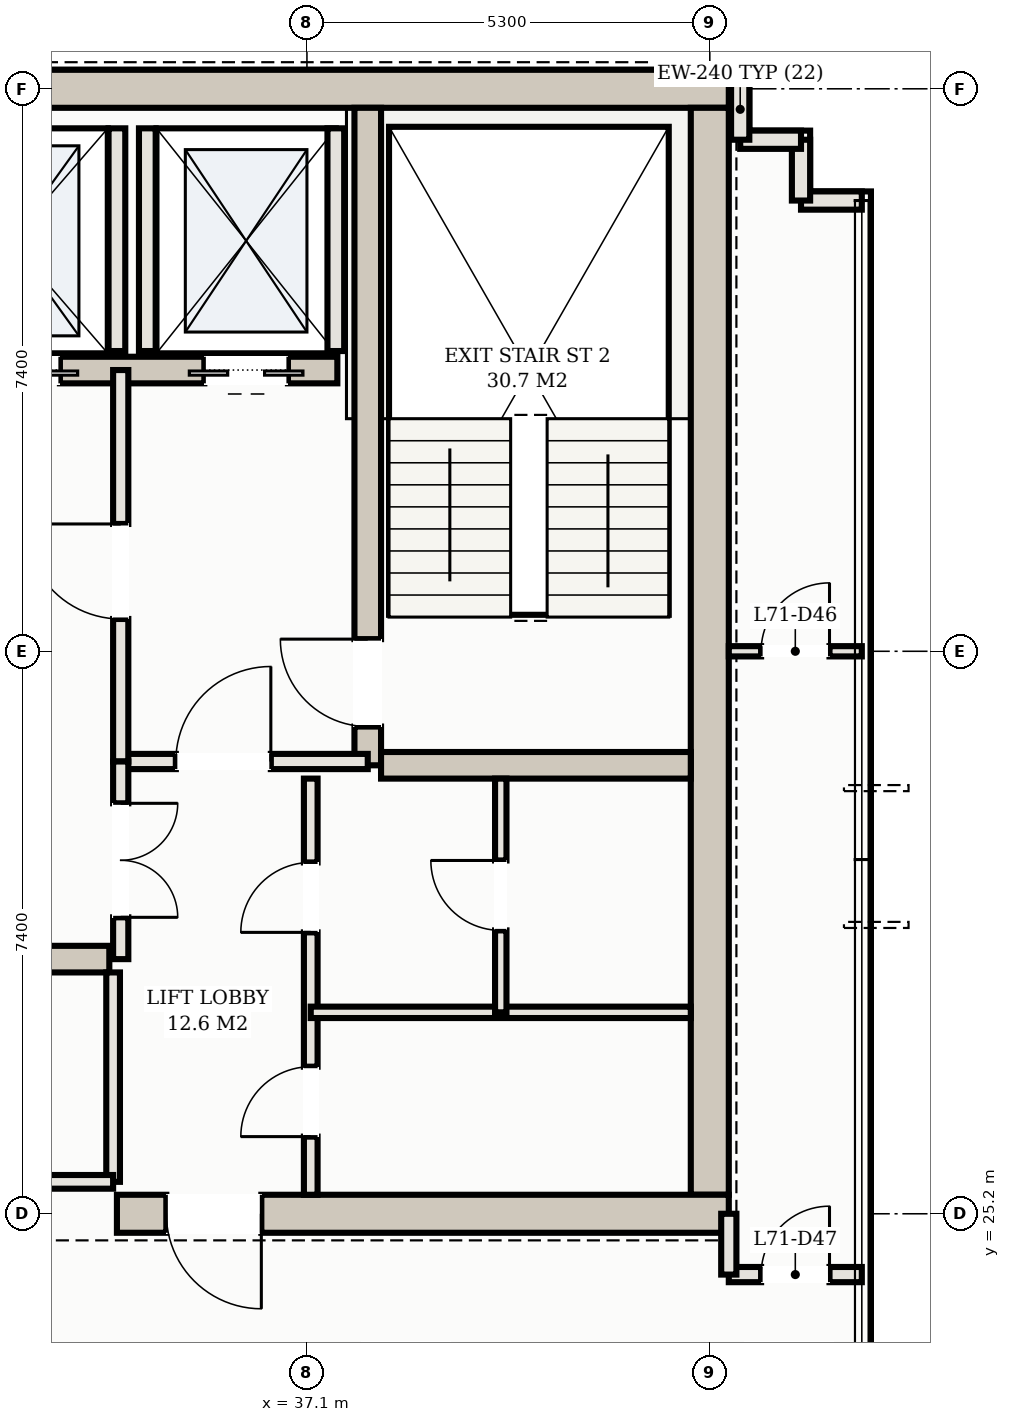
"""IFC4 building model, lengths in metres.
Left out: names, types, materials, properties, quantities, classifications, styles, units other than length and angle.
Written with IfcOpenShell. Run it as: python <this file> out.ifc"""

import sys

from ifc_helpers import new_model, si_unit, direction, frame, frame_2d, origin, place, context, subcontext, project, spatial, rectangle, extrude, element, fill, save


model = new_model("IFC4")
c1 = context("Model", 3, precision=1e-05, world=origin(), true_north=direction((0.0, 1.0)))
c2 = subcontext(c1, "Body", "Model", "MODEL_VIEW")
j1 = project(units=[si_unit("LENGTHUNIT", "METRE"), si_unit("PLANEANGLEUNIT", "RADIAN")], contexts=[c1])
p1 = place(None, origin())
s1 = spatial("IfcSite", under=j1, at=p1, CompositionType="ELEMENT")
p2 = place(p1, origin())
s2 = spatial("IfcBuilding", under=s1, at=p2, CompositionType="ELEMENT")
p3 = place(p2, frame((0.0, 0.0, 256.1)))
s3 = spatial("IfcBuildingStorey", under=s2, at=p3, CompositionType="ELEMENT", Elevation=256.1)
p4 = place(p3, frame((10.35, 40.0, 0.0), z_axis=(0.0, 0.0, 1.0), x_axis=(1.0, 0.0, 0.0)))
e1 = element("IfcWall", 1, at=p4, inside=s3, PredefinedType="SHEAR", context=c2, shape_type="SweptSolid", body=[
    extrude(rectangle(XDim=32.3, YDim=0.5, at=frame_2d((16.15, 0.0))), origin(), (0.0, 0.0, 1.0), 3.11),
])
p5 = place(p3, frame((42.4, 25.45, 0.0), z_axis=(0.0, 0.0, 1.0), x_axis=(0.0, 1.0, 0.0)))
e2 = element("IfcWall", 2, at=p5, inside=s3, PredefinedType="SHEAR", context=c2, shape_type="SweptSolid", body=[
    extrude(rectangle(XDim=14.3, YDim=0.5, at=frame_2d((7.15, 0.0))), origin(), (0.0, 0.0, 1.0), 3.11),
])
p6 = place(p3, frame((34.6, 25.2, 0.0), z_axis=(0.0, 0.0, 1.0), x_axis=(1.0, 0.0, 0.0)))
e3 = element("IfcWall", 3, at=p6, inside=s3, PredefinedType="SHEAR", context=c2, shape_type="SweptSolid", body=[
    extrude(rectangle(XDim=8.05, YDim=0.5, at=frame_2d((4.025, 0.0))), origin(), (0.0, 0.0, 1.0), 3.11),
])
p7 = place(p6, frame((0.65, 0.0, 0.0)))
e4 = element("IfcOpeningElement", 4, at=p7, cuts=e3, PredefinedType="OPENING", context=c2, shape_type="SweptSolid", body=[
    extrude(rectangle(XDim=1.25, YDim=2.2, at=frame_2d((0.625, 1.1))), frame((0.0, 0.26, 0.0), z_axis=(0.0, -1.0, 0.0), x_axis=(1.0, 0.0, 0.0)), (0.0, 0.0, 1.0), 0.52),
])
p8 = place(p3, frame((37.9, 31.1, 0.0), z_axis=(0.0, 0.0, 1.0), x_axis=(0.0, 1.0, 0.0)))
e5 = element("IfcWall", 5, at=p8, inside=s3, PredefinedType="SHEAR", context=c2, shape_type="SweptSolid", body=[
    extrude(rectangle(XDim=8.65, YDim=0.35, at=frame_2d((4.325, 0.0))), origin(), (0.0, 0.0, 1.0), 3.11),
])
p9 = place(p8, frame((0.51, 0.0, 0.0)))
e6 = element("IfcOpeningElement", 6, at=p9, cuts=e5, PredefinedType="OPENING", context=c2, shape_type="SweptSolid", body=[
    extrude(rectangle(XDim=1.15, YDim=2.2, at=frame_2d((0.575, 1.1))), frame((0.0, 0.185, 0.0), z_axis=(0.0, -1.0, 0.0), x_axis=(1.0, 0.0, 0.0)), (0.0, 0.0, 1.0), 0.37),
])
p10 = place(p3, frame((38.075, 31.1, 0.0), z_axis=(0.0, 0.0, 1.0), x_axis=(1.0, 0.0, 0.0)))
e7 = element("IfcWall", 7, at=p10, inside=s3, PredefinedType="SHEAR", context=c2, shape_type="SweptSolid", body=[
    extrude(rectangle(XDim=4.075, YDim=0.35, at=frame_2d((2.038, 0.0))), origin(), (0.0, 0.0, 1.0), 3.11),
])
p11 = place(p3, frame((15.5, 36.3, 0.0), z_axis=(0.0, 0.0, 1.0), x_axis=(1.0, 0.0, 0.0)))
e8 = element("IfcWall", 8, at=p11, inside=s3, PredefinedType="SHEAR", context=c2, shape_type="SweptSolid", body=[
    extrude(rectangle(XDim=22.0, YDim=0.35, at=frame_2d((11.0, 0.0))), origin(), (0.0, 0.0, 1.0), 3.11),
])
p12 = place(p11, frame((0.65, 0.0, 0.0)))
e9 = element("IfcOpeningElement", 9, at=p12, cuts=e8, PredefinedType="OPENING", context=c2, shape_type="SweptSolid", body=[
    extrude(rectangle(XDim=1.1, YDim=2.15, at=frame_2d((0.55, 1.075))), frame((0.0, 0.185, 0.0), z_axis=(0.0, -1.0, 0.0), x_axis=(1.0, 0.0, 0.0)), (0.0, 0.0, 1.0), 0.37),
])
p13 = place(p11, frame((20.25, 0.0, 0.0)))
e10 = element("IfcOpeningElement", 10, at=p13, cuts=e8, PredefinedType="OPENING", context=c2, shape_type="SweptSolid", body=[
    extrude(rectangle(XDim=1.1, YDim=2.15, at=frame_2d((0.55, 1.075))), frame((0.0, 0.185, 0.0), z_axis=(0.0, -1.0, 0.0), x_axis=(1.0, 0.0, 0.0)), (0.0, 0.0, 1.0), 0.37),
])
p14 = place(p11, frame((17.05, 0.0, 0.0)))
e11 = element("IfcOpeningElement", 11, at=p14, cuts=e8, PredefinedType="OPENING", context=c2, shape_type="SweptSolid", body=[
    extrude(rectangle(XDim=1.3, YDim=2.2, at=frame_2d((0.65, 1.1))), frame((0.0, 0.185, 0.0), z_axis=(0.0, -1.0, 0.0), x_axis=(1.0, 0.0, 0.0)), (0.0, 0.0, 1.0), 0.37),
])
p15 = place(p11, frame((3.95, 0.0, 0.0)))
e12 = element("IfcOpeningElement", 12, at=p15, cuts=e8, PredefinedType="OPENING", context=c2, shape_type="SweptSolid", body=[
    extrude(rectangle(XDim=1.1, YDim=2.15, at=frame_2d((0.55, 1.075))), frame((0.0, 0.185, 0.0), z_axis=(0.0, -1.0, 0.0), x_axis=(1.0, 0.0, 0.0)), (0.0, 0.0, 1.0), 0.37),
])
p16 = place(p11, frame((6.55, 0.0, 0.0)))
e13 = element("IfcOpeningElement", 13, at=p16, cuts=e8, PredefinedType="OPENING", context=c2, shape_type="SweptSolid", body=[
    extrude(rectangle(XDim=1.1, YDim=2.15, at=frame_2d((0.55, 1.075))), frame((0.0, 0.185, 0.0), z_axis=(0.0, -1.0, 0.0), x_axis=(1.0, 0.0, 0.0)), (0.0, 0.0, 1.0), 0.37),
])
p17 = place(p11, frame((9.15, 0.0, 0.0)))
e14 = element("IfcOpeningElement", 14, at=p17, cuts=e8, PredefinedType="OPENING", context=c2, shape_type="SweptSolid", body=[
    extrude(rectangle(XDim=1.1, YDim=2.15, at=frame_2d((0.55, 1.075))), frame((0.0, 0.185, 0.0), z_axis=(0.0, -1.0, 0.0), x_axis=(1.0, 0.0, 0.0)), (0.0, 0.0, 1.0), 0.37),
])
p18 = place(p3, frame((18.5, 28.55, 0.0), z_axis=(0.0, 0.0, 1.0), x_axis=(1.0, 0.0, 0.0)))
e15 = element("IfcWall", 15, at=p18, inside=s3, PredefinedType="SHEAR", context=c2, shape_type="SweptSolid", body=[
    extrude(rectangle(XDim=16.0, YDim=0.35, at=frame_2d((8.0, 0.0))), origin(), (0.0, 0.0, 1.0), 3.11),
])
for number, where, z_axis, x_axis in (
    (16, (35.0, 36.55, 0.0), (0.0, 0.0, 1.0), (0.0, 1.0, 0.0)),
    (17, (37.48, 36.55, 0.0), (0.0, 0.0, 1.0), (0.0, 1.0, 0.0)),
    (18, (34.6, 36.55, 0.0), (0.0, 0.0, 1.0), (0.0, 1.0, 0.0)),
):
    element("IfcWall", number, at=place(p3, frame(where, z_axis=z_axis, x_axis=x_axis)), inside=s3, PredefinedType="SOLIDWALL", context=c2, shape_type="SweptSolid", body=[
        extrude(rectangle(XDim=2.93, YDim=0.22, at=frame_2d((1.465, 0.0))), origin(), (0.0, 0.0, 1.0), 3.11),
    ])
p19 = place(p3, frame((44.4, 38.53, 0.0), z_axis=(0.0, 0.0, 1.0), x_axis=(-1.0, 0.0, 0.0)))
e19 = element("IfcWall", 19, at=p19, inside=s3, PredefinedType="SOLIDWALL", context=c2, shape_type="SweptSolid", body=[
    extrude(rectangle(XDim=0.8, YDim=0.24, at=frame_2d((0.4, 0.0))), origin(), (0.0, 0.0, 1.0), 3.11),
])
for number, where, z_axis, x_axis in (
    (20, (43.6, 38.53, 0.0), (0.0, 0.0, 1.0), (0.0, 1.0, 0.0)),
    (21, (43.6, 39.33, 0.0), (0.0, 0.0, 1.0), (-1.0, 0.0, 0.0)),
):
    element("IfcWall", number, at=place(p3, frame(where, z_axis=z_axis, x_axis=x_axis)), inside=s3, PredefinedType="SOLIDWALL", context=c2, shape_type="SweptSolid", body=[
        extrude(rectangle(XDim=0.8, YDim=0.24, at=frame_2d((0.4, 0.0))), origin(), (0.0, 0.0, 1.0), 3.11),
    ])
p20 = place(p3, frame((42.8, 39.33, 0.0), z_axis=(0.0, 0.0, 1.0), x_axis=(0.0, 1.0, 0.0)))
e22 = element("IfcWall", 22, at=p20, inside=s3, PredefinedType="SOLIDWALL", context=c2, shape_type="SweptSolid", body=[
    extrude(rectangle(XDim=0.8, YDim=0.24, at=frame_2d((0.4, 0.0))), origin(), (0.0, 0.0, 1.0), 3.11),
])
p21 = place(p3, frame((34.65, 31.15, 0.0), z_axis=(0.0, 0.0, 1.0), x_axis=(1.0, 0.0, 0.0)))
e23 = element("IfcWall", 23, at=p21, inside=s3, PredefinedType="PARTITIONING", context=c2, shape_type="SweptSolid", body=[
    extrude(rectangle(XDim=3.25, YDim=0.2, at=frame_2d((1.625, 0.0))), origin(), (0.0, 0.0, 1.0), 2.45),
])
p22 = place(p21, frame((0.725, 0.0, 0.0)))
e24 = element("IfcOpeningElement", 24, at=p22, cuts=e23, PredefinedType="OPENING", context=c2, shape_type="SweptSolid", body=[
    extrude(rectangle(XDim=1.25, YDim=2.2, at=frame_2d((0.625, 1.1))), frame((0.0, 0.11, 0.0), z_axis=(0.0, -1.0, 0.0), x_axis=(1.0, 0.0, 0.0)), (0.0, 0.0, 1.0), 0.22),
])
p23 = place(p3, frame((34.65, 31.15, 0.0), z_axis=(0.0, 0.0, 1.0), x_axis=(0.0, 1.0, 0.0)))
e25 = element("IfcWall", 25, at=p23, inside=s3, PredefinedType="PARTITIONING", context=c2, shape_type="SweptSolid", body=[
    extrude(rectangle(XDim=5.15, YDim=0.2, at=frame_2d((2.575, 0.0))), origin(), (0.0, 0.0, 1.0), 2.45),
])
p24 = place(p23, frame((1.875, 0.0, 0.0)))
e26 = element("IfcOpeningElement", 26, at=p24, cuts=e25, PredefinedType="OPENING", context=c2, shape_type="SweptSolid", body=[
    extrude(rectangle(XDim=1.25, YDim=2.2, at=frame_2d((0.625, 1.1))), frame((0.0, 0.11, 0.0), z_axis=(0.0, -1.0, 0.0), x_axis=(1.0, 0.0, 0.0)), (0.0, 0.0, 1.0), 0.22),
])
p25 = place(p3, frame((37.15, 25.45, 0.0), z_axis=(0.0, 0.0, 1.0), x_axis=(0.0, 1.0, 0.0)))
e27 = element("IfcWall", 27, at=p25, inside=s3, PredefinedType="PARTITIONING", context=c2, shape_type="SweptSolid", body=[
    extrude(rectangle(XDim=5.475, YDim=0.18, at=frame_2d((2.738, 0.0))), origin(), (0.0, 0.0, 1.0), 2.45),
])
p26 = place(p25, frame((0.765, 0.0, 0.0)))
e28 = element("IfcOpeningElement", 28, at=p26, cuts=e27, PredefinedType="OPENING", context=c2, shape_type="SweptSolid", body=[
    extrude(rectangle(XDim=0.92, YDim=2.15, at=frame_2d((0.46, 1.075))), frame((0.0, 0.1, 0.0), z_axis=(0.0, -1.0, 0.0), x_axis=(1.0, 0.0, 0.0)), (0.0, 0.0, 1.0), 0.2),
])
p27 = place(p25, frame((3.452, 0.0, 0.0)))
e29 = element("IfcOpeningElement", 29, at=p27, cuts=e27, PredefinedType="OPENING", context=c2, shape_type="SweptSolid", body=[
    extrude(rectangle(XDim=0.92, YDim=2.15, at=frame_2d((0.46, 1.075))), frame((0.0, 0.1, 0.0), z_axis=(0.0, -1.0, 0.0), x_axis=(1.0, 0.0, 0.0)), (0.0, 0.0, 1.0), 0.2),
])
p28 = place(p3, frame((37.15, 27.85, 0.0), z_axis=(0.0, 0.0, 1.0), x_axis=(1.0, 0.0, 0.0)))
e30 = element("IfcWall", 30, at=p28, inside=s3, PredefinedType="PARTITIONING", context=c2, shape_type="SweptSolid", body=[
    extrude(rectangle(XDim=5.0, YDim=0.15, at=frame_2d((2.5, 0.0))), origin(), (0.0, 0.0, 1.0), 2.45),
])
p29 = place(p3, frame((39.65, 27.85, 0.0), z_axis=(0.0, 0.0, 1.0), x_axis=(0.0, 1.0, 0.0)))
e31 = element("IfcWall", 31, at=p29, inside=s3, PredefinedType="PARTITIONING", context=c2, shape_type="SweptSolid", body=[
    extrude(rectangle(XDim=3.075, YDim=0.15, at=frame_2d((1.538, 0.0))), origin(), (0.0, 0.0, 1.0), 2.45),
])
p30 = place(p29, frame((1.078, 0.0, 0.0)))
e32 = element("IfcOpeningElement", 32, at=p30, cuts=e31, PredefinedType="OPENING", context=c2, shape_type="SweptSolid", body=[
    extrude(rectangle(XDim=0.92, YDim=2.15, at=frame_2d((0.46, 1.075))), frame((0.0, 0.085, 0.0), z_axis=(0.0, -1.0, 0.0), x_axis=(1.0, 0.0, 0.0)), (0.0, 0.0, 1.0), 0.17),
])
p31 = place(p3, frame((34.65, 28.55, 0.0), z_axis=(0.0, 0.0, 1.0), x_axis=(0.0, 1.0, 0.0)))
e33 = element("IfcWall", 33, at=p31, inside=s3, PredefinedType="PARTITIONING", context=c2, shape_type="SweptSolid", body=[
    extrude(rectangle(XDim=2.6, YDim=0.2, at=frame_2d((1.3, 0.0))), origin(), (0.0, 0.0, 1.0), 2.45),
])
p32 = place(p31, frame((0.55, 0.0, 0.0)))
e34 = element("IfcOpeningElement", 34, at=p32, cuts=e33, PredefinedType="OPENING", context=c2, shape_type="SweptSolid", body=[
    extrude(rectangle(XDim=1.5, YDim=2.25, at=frame_2d((0.75, 1.125))), frame((0.0, 0.11, 0.0), z_axis=(0.0, -1.0, 0.0), x_axis=(1.0, 0.0, 0.0)), (0.0, 0.0, 1.0), 0.22),
])
p33 = place(p3, frame((34.55, 25.62, 0.0), z_axis=(0.0, 0.0, 1.0), x_axis=(0.0, 1.0, 0.0)))
e35 = element("IfcWall", 35, at=p33, inside=s3, PredefinedType="PARTITIONING", context=c2, shape_type="SweptSolid", body=[
    extrude(rectangle(XDim=2.755, YDim=0.18, at=frame_2d((1.377, 0.0))), origin(), (0.0, 0.0, 1.0), 2.45),
])
p34 = place(p3, frame((26.65, 25.62, 0.0), z_axis=(0.0, 0.0, 1.0), x_axis=(1.0, 0.0, 0.0)))
e36 = element("IfcWall", 36, at=p34, inside=s3, PredefinedType="PARTITIONING", context=c2, shape_type="SweptSolid", body=[
    extrude(rectangle(XDim=7.9, YDim=0.18, at=frame_2d((3.95, 0.0))), origin(), (0.0, 0.0, 1.0), 2.45),
])
p35 = place(p34, frame((3.34, 0.0, 0.0)))
e37 = element("IfcOpeningElement", 37, at=p35, cuts=e36, PredefinedType="OPENING", context=c2, shape_type="SweptSolid", body=[
    extrude(rectangle(XDim=0.92, YDim=2.15, at=frame_2d((0.46, 1.075))), frame((0.0, 0.1, 0.0), z_axis=(0.0, -1.0, 0.0), x_axis=(1.0, 0.0, 0.0)), (0.0, 0.0, 1.0), 0.2),
])
p36 = place(p3, frame((42.65, 24.4, 0.0), z_axis=(0.0, 0.0, 1.0), x_axis=(1.0, 0.0, 0.0)))
e38 = element("IfcWall", 38, at=p36, inside=s3, PredefinedType="PARTITIONING", context=c2, shape_type="SweptSolid", body=[
    extrude(rectangle(XDim=1.75, YDim=0.2, at=frame_2d((0.875, 0.0))), origin(), (0.0, 0.0, 1.0), 2.45),
])
p37 = place(p36, frame((0.425, 0.0, 0.0)))
e39 = element("IfcOpeningElement", 39, at=p37, cuts=e38, PredefinedType="OPENING", context=c2, shape_type="SweptSolid", body=[
    extrude(rectangle(XDim=0.9, YDim=2.15, at=frame_2d((0.45, 1.075))), frame((0.0, 0.11, 0.0), z_axis=(0.0, -1.0, 0.0), x_axis=(1.0, 0.0, 0.0)), (0.0, 0.0, 1.0), 0.22),
])
p38 = place(p3, frame((42.65, 24.4, 0.0), z_axis=(0.0, 0.0, 1.0), x_axis=(0.0, 1.0, 0.0)))
e40 = element("IfcWall", 40, at=p38, inside=s3, PredefinedType="PARTITIONING", context=c2, shape_type="SweptSolid", body=[
    extrude(rectangle(XDim=0.8, YDim=0.2, at=frame_2d((0.4, 0.0))), origin(), (0.0, 0.0, 1.0), 2.45),
])
p39 = place(p3, frame((42.65, 32.6, 0.0), z_axis=(0.0, 0.0, 1.0), x_axis=(1.0, 0.0, 0.0)))
e41 = element("IfcWall", 41, at=p39, inside=s3, PredefinedType="PARTITIONING", context=c2, shape_type="SweptSolid", body=[
    extrude(rectangle(XDim=1.75, YDim=0.135, at=frame_2d((0.875, 0.0))), origin(), (0.0, 0.0, 1.0), 2.45),
])
p40 = place(p39, frame((0.425, 0.0, 0.0)))
e42 = element("IfcOpeningElement", 42, at=p40, cuts=e41, PredefinedType="OPENING", context=c2, shape_type="SweptSolid", body=[
    extrude(rectangle(XDim=0.9, YDim=2.15, at=frame_2d((0.45, 1.075))), frame((0.0, 0.078, 0.0), z_axis=(0.0, -1.0, 0.0), x_axis=(1.0, 0.0, 0.0)), (0.0, 0.0, 1.0), 0.155),
])
p41 = place(p13, frame((1.1, 0.0, 0.0), z_axis=(0.0, 0.0, 1.0), x_axis=(-1.0, 0.0, 0.0)))
e43 = element("IfcDoor", 43, at=p41, inside=s3, OperationType="DOUBLE_DOOR_SLIDING", PredefinedType="DOOR", context=c2, shape_type="SweptSolid", body=[
    extrude(rectangle(XDim=1.1, YDim=2.15, at=frame_2d((0.55, 1.075))), frame((0.0, 0.025, 0.0), z_axis=(0.0, -1.0, 0.0), x_axis=(1.0, 0.0, 0.0)), (0.0, 0.0, 1.0), 0.05),
])
fill(e10, e43)
p42 = place(p14, frame((1.3, 0.0, 0.0), z_axis=(0.0, 0.0, 1.0), x_axis=(-1.0, 0.0, 0.0)))
e44 = element("IfcDoor", 44, at=p42, inside=s3, OperationType="DOUBLE_DOOR_SLIDING", PredefinedType="DOOR", context=c2, shape_type="SweptSolid", body=[
    extrude(rectangle(XDim=1.3, YDim=2.2, at=frame_2d((0.65, 1.1))), frame((0.0, 0.025, 0.0), z_axis=(0.0, -1.0, 0.0), x_axis=(1.0, 0.0, 0.0)), (0.0, 0.0, 1.0), 0.05),
])
fill(e11, e44)
p43 = place(p7, frame((1.25, 0.0, 0.0), z_axis=(0.0, 0.0, 1.0), x_axis=(-1.0, 0.0, 0.0)))
e45 = element("IfcDoor", 45, at=p43, inside=s3, OperationType="SINGLE_SWING_LEFT", PredefinedType="DOOR", context=c2, shape_type="SweptSolid", body=[
    extrude(rectangle(XDim=1.25, YDim=2.2, at=frame_2d((0.625, 1.1))), frame((0.0, 0.025, 0.0), z_axis=(0.0, -1.0, 0.0), x_axis=(1.0, 0.0, 0.0)), (0.0, 0.0, 1.0), 0.05),
])
fill(e4, e45)
p44 = place(p22, origin())
e46 = element("IfcDoor", 46, at=p44, inside=s3, OperationType="SINGLE_SWING_RIGHT", PredefinedType="DOOR", context=c2, shape_type="SweptSolid", body=[
    extrude(rectangle(XDim=1.25, YDim=2.2, at=frame_2d((0.625, 1.1))), frame((0.0, 0.025, 0.0), z_axis=(0.0, -1.0, 0.0), x_axis=(1.0, 0.0, 0.0)), (0.0, 0.0, 1.0), 0.05),
])
fill(e24, e46)
p45 = place(p24, origin())
e47 = element("IfcDoor", 47, at=p45, inside=s3, OperationType="SINGLE_SWING_RIGHT", PredefinedType="DOOR", context=c2, shape_type="SweptSolid", body=[
    extrude(rectangle(XDim=1.25, YDim=2.2, at=frame_2d((0.625, 1.1))), frame((0.0, 0.025, 0.0), z_axis=(0.0, -1.0, 0.0), x_axis=(1.0, 0.0, 0.0)), (0.0, 0.0, 1.0), 0.05),
])
fill(e26, e47)
p46 = place(p9, origin())
e48 = element("IfcDoor", 48, at=p46, inside=s3, OperationType="SINGLE_SWING_RIGHT", PredefinedType="DOOR", context=c2, shape_type="SweptSolid", body=[
    extrude(rectangle(XDim=1.15, YDim=2.2, at=frame_2d((0.575, 1.1))), frame((0.0, 0.025, 0.0), z_axis=(0.0, -1.0, 0.0), x_axis=(1.0, 0.0, 0.0)), (0.0, 0.0, 1.0), 0.05),
])
fill(e6, e48)
p47 = place(p26, origin())
e49 = element("IfcDoor", 49, at=p47, inside=s3, OperationType="SINGLE_SWING_LEFT", PredefinedType="DOOR", context=c2, shape_type="SweptSolid", body=[
    extrude(rectangle(XDim=0.92, YDim=2.15, at=frame_2d((0.46, 1.075))), frame((0.0, 0.025, 0.0), z_axis=(0.0, -1.0, 0.0), x_axis=(1.0, 0.0, 0.0)), (0.0, 0.0, 1.0), 0.05),
])
fill(e28, e49)
p48 = place(p27, origin())
e50 = element("IfcDoor", 50, at=p48, inside=s3, OperationType="SINGLE_SWING_LEFT", PredefinedType="DOOR", context=c2, shape_type="SweptSolid", body=[
    extrude(rectangle(XDim=0.92, YDim=2.15, at=frame_2d((0.46, 1.075))), frame((0.0, 0.025, 0.0), z_axis=(0.0, -1.0, 0.0), x_axis=(1.0, 0.0, 0.0)), (0.0, 0.0, 1.0), 0.05),
])
fill(e29, e50)
p49 = place(p30, origin())
e51 = element("IfcDoor", 51, at=p49, inside=s3, OperationType="SINGLE_SWING_RIGHT", PredefinedType="DOOR", context=c2, shape_type="SweptSolid", body=[
    extrude(rectangle(XDim=0.92, YDim=2.15, at=frame_2d((0.46, 1.075))), frame((0.0, 0.025, 0.0), z_axis=(0.0, -1.0, 0.0), x_axis=(1.0, 0.0, 0.0)), (0.0, 0.0, 1.0), 0.05),
])
fill(e32, e51)
p50 = place(p32, frame((1.5, 0.0, 0.0), z_axis=(0.0, 0.0, 1.0), x_axis=(-1.0, 0.0, 0.0)))
e52 = element("IfcDoor", 52, at=p50, inside=s3, OperationType="DOUBLE_DOOR_SINGLE_SWING", PredefinedType="DOOR", context=c2, shape_type="SweptSolid", body=[
    extrude(rectangle(XDim=1.5, YDim=2.25, at=frame_2d((0.75, 1.125))), frame((0.0, 0.025, 0.0), z_axis=(0.0, -1.0, 0.0), x_axis=(1.0, 0.0, 0.0)), (0.0, 0.0, 1.0), 0.05),
])
fill(e34, e52)
p51 = place(p40, origin())
e53 = element("IfcDoor", 53, at=p51, inside=s3, OperationType="SINGLE_SWING_RIGHT", PredefinedType="DOOR", context=c2, shape_type="SweptSolid", body=[
    extrude(rectangle(XDim=0.9, YDim=2.15, at=frame_2d((0.45, 1.075))), frame((0.0, 0.025, 0.0), z_axis=(0.0, -1.0, 0.0), x_axis=(1.0, 0.0, 0.0)), (0.0, 0.0, 1.0), 0.05),
])
fill(e42, e53)
p52 = place(p37, origin())
e54 = element("IfcDoor", 54, at=p52, inside=s3, OperationType="SINGLE_SWING_RIGHT", PredefinedType="DOOR", context=c2, shape_type="SweptSolid", body=[
    extrude(rectangle(XDim=0.9, YDim=2.15, at=frame_2d((0.45, 1.075))), frame((0.0, 0.025, 0.0), z_axis=(0.0, -1.0, 0.0), x_axis=(1.0, 0.0, 0.0)), (0.0, 0.0, 1.0), 0.05),
])
fill(e39, e54)
save(model, sys.argv[1])
